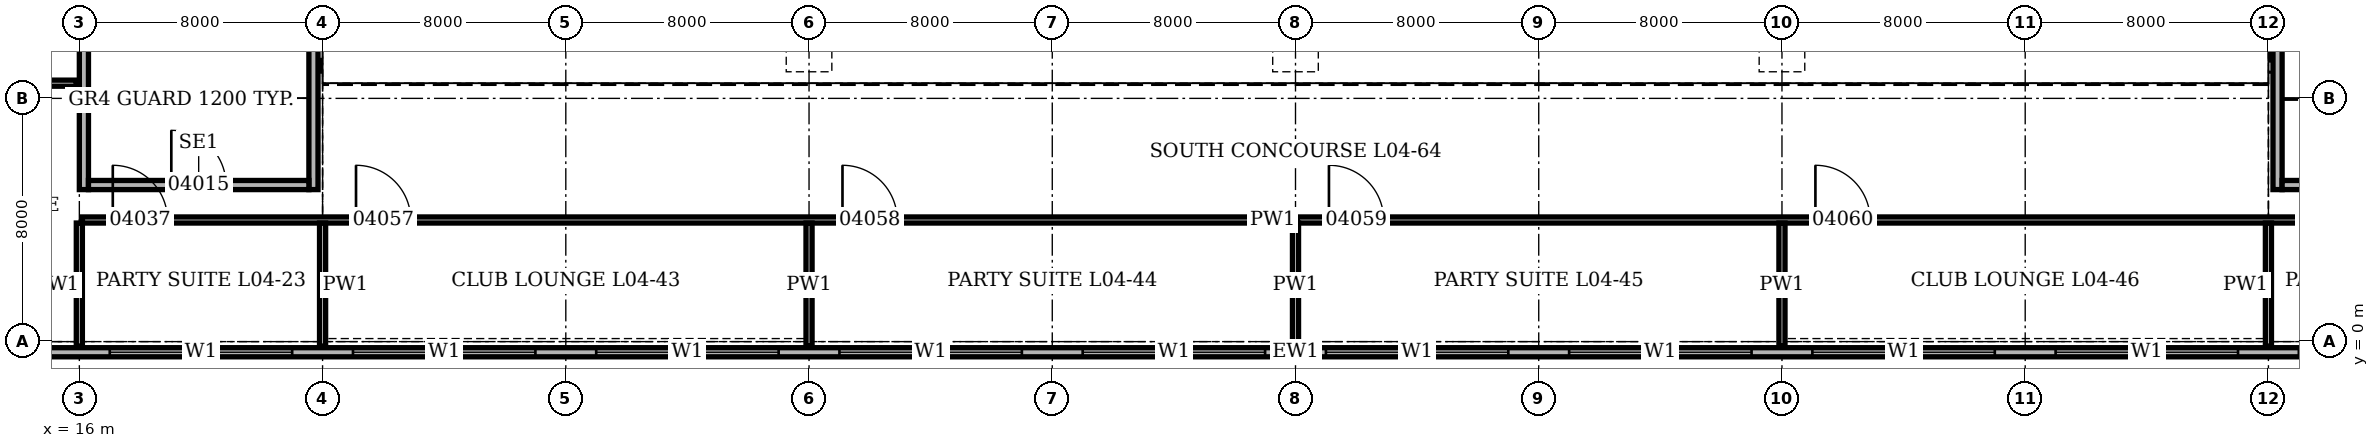
"""IFC4 building model, lengths in metres.
Left out: names, types, materials, properties, quantities, classifications, styles, units other than length and angle.
Written with IfcOpenShell. Run it as: python <this file> out.ifc"""

import sys

from ifc_helpers import new_model, si_unit, direction, frame, frame_2d, origin, place, context, subcontext, project, spatial, rectangle, extrude, element, fill, save


model = new_model("IFC4")
c1 = context("Model", 3, precision=1e-05, world=origin(), true_north=direction((0.0, 1.0)))
c2 = subcontext(c1, "Body", "Model", "MODEL_VIEW")
j1 = project(units=[si_unit("LENGTHUNIT", "METRE"), si_unit("PLANEANGLEUNIT", "RADIAN")], contexts=[c1])
p1 = place(None, origin())
s1 = spatial("IfcSite", under=j1, at=p1, CompositionType="ELEMENT")
p2 = place(p1, origin())
s2 = spatial("IfcBuilding", under=s1, at=p2, CompositionType="ELEMENT")
p3 = place(p2, frame((0.0, 0.0, 19.9)))
s3 = spatial("IfcBuildingStorey", under=s2, at=p3, CompositionType="ELEMENT", Elevation=19.9)
p4 = place(p3, frame((-0.35, -0.35, 0.0), z_axis=(0.0, 0.0, 1.0), x_axis=(1.0, 0.0, 0.0)))
e1 = element("IfcWall", 1, at=p4, inside=s3, PredefinedType="SOLIDWALL", context=c2, shape_type="SweptSolid", body=[
    extrude(rectangle(XDim=112.7, YDim=0.3, at=frame_2d((56.35, 0.0))), origin(), (0.0, 0.0, 1.0), 6.0),
])
p5 = place(p4, frame((1.35, 0.0, 1.0)))
e2 = element("IfcOpeningElement", 2, at=p5, cuts=e1, PredefinedType="OPENING", context=c2, shape_type="SweptSolid", body=[
    extrude(rectangle(XDim=6.0, YDim=1.5, at=frame_2d((3.0, 0.75))), frame((0.0, 0.16, 0.0), z_axis=(0.0, -1.0, 0.0), x_axis=(1.0, 0.0, 0.0)), (0.0, 0.0, 1.0), 0.32),
])
p6 = place(p4, frame((9.35, 0.0, 1.0)))
e3 = element("IfcOpeningElement", 3, at=p6, cuts=e1, PredefinedType="OPENING", context=c2, shape_type="SweptSolid", body=[
    extrude(rectangle(XDim=6.0, YDim=1.5, at=frame_2d((3.0, 0.75))), frame((0.0, 0.16, 0.0), z_axis=(0.0, -1.0, 0.0), x_axis=(1.0, 0.0, 0.0)), (0.0, 0.0, 1.0), 0.32),
])
p7 = place(p4, frame((17.35, 0.0, 1.0)))
e4 = element("IfcOpeningElement", 4, at=p7, cuts=e1, PredefinedType="OPENING", context=c2, shape_type="SweptSolid", body=[
    extrude(rectangle(XDim=6.0, YDim=1.5, at=frame_2d((3.0, 0.75))), frame((0.0, 0.16, 0.0), z_axis=(0.0, -1.0, 0.0), x_axis=(1.0, 0.0, 0.0)), (0.0, 0.0, 1.0), 0.32),
])
p8 = place(p4, frame((25.35, 0.0, 1.0)))
e5 = element("IfcOpeningElement", 5, at=p8, cuts=e1, PredefinedType="OPENING", context=c2, shape_type="SweptSolid", body=[
    extrude(rectangle(XDim=6.0, YDim=1.5, at=frame_2d((3.0, 0.75))), frame((0.0, 0.16, 0.0), z_axis=(0.0, -1.0, 0.0), x_axis=(1.0, 0.0, 0.0)), (0.0, 0.0, 1.0), 0.32),
])
p9 = place(p4, frame((33.35, 0.0, 1.0)))
e6 = element("IfcOpeningElement", 6, at=p9, cuts=e1, PredefinedType="OPENING", context=c2, shape_type="SweptSolid", body=[
    extrude(rectangle(XDim=6.0, YDim=1.5, at=frame_2d((3.0, 0.75))), frame((0.0, 0.16, 0.0), z_axis=(0.0, -1.0, 0.0), x_axis=(1.0, 0.0, 0.0)), (0.0, 0.0, 1.0), 0.32),
])
p10 = place(p4, frame((41.35, 0.0, 1.0)))
e7 = element("IfcOpeningElement", 7, at=p10, cuts=e1, PredefinedType="OPENING", context=c2, shape_type="SweptSolid", body=[
    extrude(rectangle(XDim=6.0, YDim=1.5, at=frame_2d((3.0, 0.75))), frame((0.0, 0.16, 0.0), z_axis=(0.0, -1.0, 0.0), x_axis=(1.0, 0.0, 0.0)), (0.0, 0.0, 1.0), 0.32),
])
p11 = place(p4, frame((49.35, 0.0, 1.0)))
e8 = element("IfcOpeningElement", 8, at=p11, cuts=e1, PredefinedType="OPENING", context=c2, shape_type="SweptSolid", body=[
    extrude(rectangle(XDim=6.0, YDim=1.5, at=frame_2d((3.0, 0.75))), frame((0.0, 0.16, 0.0), z_axis=(0.0, -1.0, 0.0), x_axis=(1.0, 0.0, 0.0)), (0.0, 0.0, 1.0), 0.32),
])
p12 = place(p4, frame((57.35, 0.0, 1.0)))
e9 = element("IfcOpeningElement", 9, at=p12, cuts=e1, PredefinedType="OPENING", context=c2, shape_type="SweptSolid", body=[
    extrude(rectangle(XDim=6.0, YDim=1.5, at=frame_2d((3.0, 0.75))), frame((0.0, 0.16, 0.0), z_axis=(0.0, -1.0, 0.0), x_axis=(1.0, 0.0, 0.0)), (0.0, 0.0, 1.0), 0.32),
])
p13 = place(p4, frame((65.35, 0.0, 1.0)))
e10 = element("IfcOpeningElement", 10, at=p13, cuts=e1, PredefinedType="OPENING", context=c2, shape_type="SweptSolid", body=[
    extrude(rectangle(XDim=6.0, YDim=1.5, at=frame_2d((3.0, 0.75))), frame((0.0, 0.16, 0.0), z_axis=(0.0, -1.0, 0.0), x_axis=(1.0, 0.0, 0.0)), (0.0, 0.0, 1.0), 0.32),
])
p14 = place(p4, frame((73.35, 0.0, 1.0)))
e11 = element("IfcOpeningElement", 11, at=p14, cuts=e1, PredefinedType="OPENING", context=c2, shape_type="SweptSolid", body=[
    extrude(rectangle(XDim=6.0, YDim=1.5, at=frame_2d((3.0, 0.75))), frame((0.0, 0.16, 0.0), z_axis=(0.0, -1.0, 0.0), x_axis=(1.0, 0.0, 0.0)), (0.0, 0.0, 1.0), 0.32),
])
p15 = place(p4, frame((81.35, 0.0, 1.0)))
e12 = element("IfcOpeningElement", 12, at=p15, cuts=e1, PredefinedType="OPENING", context=c2, shape_type="SweptSolid", body=[
    extrude(rectangle(XDim=6.0, YDim=1.5, at=frame_2d((3.0, 0.75))), frame((0.0, 0.16, 0.0), z_axis=(0.0, -1.0, 0.0), x_axis=(1.0, 0.0, 0.0)), (0.0, 0.0, 1.0), 0.32),
])
p16 = place(p4, frame((89.35, 0.0, 1.0)))
e13 = element("IfcOpeningElement", 13, at=p16, cuts=e1, PredefinedType="OPENING", context=c2, shape_type="SweptSolid", body=[
    extrude(rectangle(XDim=6.0, YDim=1.5, at=frame_2d((3.0, 0.75))), frame((0.0, 0.16, 0.0), z_axis=(0.0, -1.0, 0.0), x_axis=(1.0, 0.0, 0.0)), (0.0, 0.0, 1.0), 0.32),
])
p17 = place(p4, frame((97.35, 0.0, 1.0)))
e14 = element("IfcOpeningElement", 14, at=p17, cuts=e1, PredefinedType="OPENING", context=c2, shape_type="SweptSolid", body=[
    extrude(rectangle(XDim=6.0, YDim=1.5, at=frame_2d((3.0, 0.75))), frame((0.0, 0.16, 0.0), z_axis=(0.0, -1.0, 0.0), x_axis=(1.0, 0.0, 0.0)), (0.0, 0.0, 1.0), 0.32),
])
p18 = place(p4, frame((105.35, 0.0, 1.0)))
e15 = element("IfcOpeningElement", 15, at=p18, cuts=e1, PredefinedType="OPENING", context=c2, shape_type="SweptSolid", body=[
    extrude(rectangle(XDim=6.0, YDim=1.5, at=frame_2d((3.0, 0.75))), frame((0.0, 0.16, 0.0), z_axis=(0.0, -1.0, 0.0), x_axis=(1.0, 0.0, 0.0)), (0.0, 0.0, 1.0), 0.32),
])
for number, where, z_axis, x_axis in (
    (16, (16.15, 5.0, 0.0), (0.0, 0.0, 1.0), (0.0, 1.0, 0.0)),
    (17, (23.7, 5.0, 0.0), (0.0, 0.0, 1.0), (0.0, 1.0, 0.0)),
):
    element("IfcWall", number, at=place(p3, frame(where, z_axis=z_axis, x_axis=x_axis)), inside=s3, PredefinedType="SOLIDWALL", context=c2, shape_type="SweptSolid", body=[
        extrude(rectangle(XDim=10.85, YDim=0.3, at=frame_2d((5.425, 0.0))), origin(), (0.0, 0.0, 1.0), 5.75),
    ])
p19 = place(p3, frame((16.3, 5.15, 0.0), z_axis=(0.0, 0.0, 1.0), x_axis=(1.0, 0.0, 0.0)))
e18 = element("IfcWall", 18, at=p19, inside=s3, PredefinedType="SOLIDWALL", context=c2, shape_type="SweptSolid", body=[
    extrude(rectangle(XDim=7.25, YDim=0.3, at=frame_2d((3.625, 0.0))), origin(), (0.0, 0.0, 1.0), 5.75),
])
p20 = place(p19, frame((2.725, 0.0, 0.0)))
e19 = element("IfcOpeningElement", 19, at=p20, cuts=e18, PredefinedType="OPENING", context=c2, shape_type="SweptSolid", body=[
    extrude(rectangle(XDim=1.8, YDim=2.1, at=frame_2d((0.9, 1.05))), frame((0.0, 0.16, 0.0), z_axis=(0.0, -1.0, 0.0), x_axis=(1.0, 0.0, 0.0)), (0.0, 0.0, 1.0), 0.32),
])
p21 = place(p3, frame((88.3, 5.0, 0.0), z_axis=(0.0, 0.0, 1.0), x_axis=(0.0, 1.0, 0.0)))
e20 = element("IfcWall", 20, at=p21, inside=s3, PredefinedType="SOLIDWALL", context=c2, shape_type="SweptSolid", body=[
    extrude(rectangle(XDim=10.85, YDim=0.3, at=frame_2d((5.425, 0.0))), origin(), (0.0, 0.0, 1.0), 5.75),
])
p22 = place(p3, frame((88.45, 5.15, 0.0), z_axis=(0.0, 0.0, 1.0), x_axis=(1.0, 0.0, 0.0)))
e21 = element("IfcWall", 21, at=p22, inside=s3, PredefinedType="SOLIDWALL", context=c2, shape_type="SweptSolid", body=[
    extrude(rectangle(XDim=7.25, YDim=0.3, at=frame_2d((3.625, 0.0))), origin(), (0.0, 0.0, 1.0), 5.75),
])
p23 = place(p22, frame((2.725, 0.0, 0.0)))
e22 = element("IfcOpeningElement", 22, at=p23, cuts=e21, PredefinedType="OPENING", context=c2, shape_type="SweptSolid", body=[
    extrude(rectangle(XDim=1.8, YDim=2.1, at=frame_2d((0.9, 1.05))), frame((0.0, 0.16, 0.0), z_axis=(0.0, -1.0, 0.0), x_axis=(1.0, 0.0, 0.0)), (0.0, 0.0, 1.0), 0.32),
])
p24 = place(p3, frame((16.1, 4.0, 0.0), z_axis=(0.0, 0.0, 1.0), x_axis=(1.0, 0.0, 0.0)))
e23 = element("IfcWall", 23, at=p24, inside=s3, PredefinedType="PARTITIONING", context=c2, shape_type="SweptSolid", body=[
    extrude(rectangle(XDim=79.8, YDim=0.2, at=frame_2d((39.9, 0.0))), origin(), (0.0, 0.0, 1.0), 5.75),
])
p25 = place(p24, frame((1.0, 0.0, 0.0)))
e24 = element("IfcOpeningElement", 24, at=p25, cuts=e23, PredefinedType="OPENING", context=c2, shape_type="SweptSolid", body=[
    extrude(rectangle(XDim=1.8, YDim=2.4, at=frame_2d((0.9, 1.2))), frame((0.0, 0.11, 0.0), z_axis=(0.0, -1.0, 0.0), x_axis=(1.0, 0.0, 0.0)), (0.0, 0.0, 1.0), 0.22),
])
p26 = place(p24, frame((73.0, 0.0, 0.0)))
e25 = element("IfcOpeningElement", 25, at=p26, cuts=e23, PredefinedType="OPENING", context=c2, shape_type="SweptSolid", body=[
    extrude(rectangle(XDim=1.8, YDim=2.4, at=frame_2d((0.9, 1.2))), frame((0.0, 0.11, 0.0), z_axis=(0.0, -1.0, 0.0), x_axis=(1.0, 0.0, 0.0)), (0.0, 0.0, 1.0), 0.22),
])
p27 = place(p24, frame((9.0, 0.0, 0.0)))
e26 = element("IfcOpeningElement", 26, at=p27, cuts=e23, PredefinedType="OPENING", context=c2, shape_type="SweptSolid", body=[
    extrude(rectangle(XDim=1.8, YDim=2.4, at=frame_2d((0.9, 1.2))), frame((0.0, 0.11, 0.0), z_axis=(0.0, -1.0, 0.0), x_axis=(1.0, 0.0, 0.0)), (0.0, 0.0, 1.0), 0.22),
])
p28 = place(p24, frame((25.0, 0.0, 0.0)))
e27 = element("IfcOpeningElement", 27, at=p28, cuts=e23, PredefinedType="OPENING", context=c2, shape_type="SweptSolid", body=[
    extrude(rectangle(XDim=1.8, YDim=2.4, at=frame_2d((0.9, 1.2))), frame((0.0, 0.11, 0.0), z_axis=(0.0, -1.0, 0.0), x_axis=(1.0, 0.0, 0.0)), (0.0, 0.0, 1.0), 0.22),
])
p29 = place(p24, frame((41.0, 0.0, 0.0)))
e28 = element("IfcOpeningElement", 28, at=p29, cuts=e23, PredefinedType="OPENING", context=c2, shape_type="SweptSolid", body=[
    extrude(rectangle(XDim=1.8, YDim=2.4, at=frame_2d((0.9, 1.2))), frame((0.0, 0.11, 0.0), z_axis=(0.0, -1.0, 0.0), x_axis=(1.0, 0.0, 0.0)), (0.0, 0.0, 1.0), 0.22),
])
p30 = place(p24, frame((57.0, 0.0, 0.0)))
e29 = element("IfcOpeningElement", 29, at=p30, cuts=e23, PredefinedType="OPENING", context=c2, shape_type="SweptSolid", body=[
    extrude(rectangle(XDim=1.8, YDim=2.4, at=frame_2d((0.9, 1.2))), frame((0.0, 0.11, 0.0), z_axis=(0.0, -1.0, 0.0), x_axis=(1.0, 0.0, 0.0)), (0.0, 0.0, 1.0), 0.22),
])
p31 = place(p3, frame((11.6, 8.5, 0.0), z_axis=(0.0, 0.0, 1.0), x_axis=(1.0, 0.0, 0.0)))
e30 = element("IfcWall", 30, at=p31, inside=s3, PredefinedType="PARTITIONING", context=c2, shape_type="SweptSolid", body=[
    extrude(rectangle(XDim=4.3, YDim=0.2, at=frame_2d((2.15, 0.0))), origin(), (0.0, 0.0, 1.0), 5.75),
])
for number, where, z_axis, x_axis in (
    (31, (16.0, -0.15, 0.0), (0.0, 0.0, 1.0), (0.0, 1.0, 0.0)),
    (32, (24.0, -0.15, 0.0), (0.0, 0.0, 1.0), (0.0, 1.0, 0.0)),
    (33, (40.0, -0.15, 0.0), (0.0, 0.0, 1.0), (0.0, 1.0, 0.0)),
    (34, (56.0, -0.15, 0.0), (0.0, 0.0, 1.0), (0.0, 1.0, 0.0)),
    (35, (72.0, -0.15, 0.0), (0.0, 0.0, 1.0), (0.0, 1.0, 0.0)),
    (36, (88.0, -0.15, 0.0), (0.0, 0.0, 1.0), (0.0, 1.0, 0.0)),
):
    element("IfcWall", number, at=place(p3, frame(where, z_axis=z_axis, x_axis=x_axis)), inside=s3, PredefinedType="PARTITIONING", context=c2, shape_type="SweptSolid", body=[
        extrude(rectangle(XDim=4.05, YDim=0.2, at=frame_2d((2.025, 0.0))), origin(), (0.0, 0.0, 1.0), 5.75),
    ])
p32 = place(p7, origin())
e37 = element("IfcWindow", 37, at=p32, inside=s3, PartitioningType="SINGLE_PANEL", PredefinedType="WINDOW", context=c2, shape_type="SweptSolid", body=[
    extrude(rectangle(XDim=6.0, YDim=1.5, at=frame_2d((3.0, 0.75))), frame((0.0, 0.03, 0.0), z_axis=(0.0, -1.0, 0.0), x_axis=(1.0, 0.0, 0.0)), (0.0, 0.0, 1.0), 0.06),
])
fill(e4, e37)
p33 = place(p8, origin())
e38 = element("IfcWindow", 38, at=p33, inside=s3, PartitioningType="SINGLE_PANEL", PredefinedType="WINDOW", context=c2, shape_type="SweptSolid", body=[
    extrude(rectangle(XDim=6.0, YDim=1.5, at=frame_2d((3.0, 0.75))), frame((0.0, 0.03, 0.0), z_axis=(0.0, -1.0, 0.0), x_axis=(1.0, 0.0, 0.0)), (0.0, 0.0, 1.0), 0.06),
])
fill(e5, e38)
p34 = place(p9, origin())
e39 = element("IfcWindow", 39, at=p34, inside=s3, PartitioningType="SINGLE_PANEL", PredefinedType="WINDOW", context=c2, shape_type="SweptSolid", body=[
    extrude(rectangle(XDim=6.0, YDim=1.5, at=frame_2d((3.0, 0.75))), frame((0.0, 0.03, 0.0), z_axis=(0.0, -1.0, 0.0), x_axis=(1.0, 0.0, 0.0)), (0.0, 0.0, 1.0), 0.06),
])
fill(e6, e39)
p35 = place(p10, origin())
e40 = element("IfcWindow", 40, at=p35, inside=s3, PartitioningType="SINGLE_PANEL", PredefinedType="WINDOW", context=c2, shape_type="SweptSolid", body=[
    extrude(rectangle(XDim=6.0, YDim=1.5, at=frame_2d((3.0, 0.75))), frame((0.0, 0.03, 0.0), z_axis=(0.0, -1.0, 0.0), x_axis=(1.0, 0.0, 0.0)), (0.0, 0.0, 1.0), 0.06),
])
fill(e7, e40)
p36 = place(p11, origin())
e41 = element("IfcWindow", 41, at=p36, inside=s3, PartitioningType="SINGLE_PANEL", PredefinedType="WINDOW", context=c2, shape_type="SweptSolid", body=[
    extrude(rectangle(XDim=6.0, YDim=1.5, at=frame_2d((3.0, 0.75))), frame((0.0, 0.03, 0.0), z_axis=(0.0, -1.0, 0.0), x_axis=(1.0, 0.0, 0.0)), (0.0, 0.0, 1.0), 0.06),
])
fill(e8, e41)
p37 = place(p12, origin())
e42 = element("IfcWindow", 42, at=p37, inside=s3, PartitioningType="SINGLE_PANEL", PredefinedType="WINDOW", context=c2, shape_type="SweptSolid", body=[
    extrude(rectangle(XDim=6.0, YDim=1.5, at=frame_2d((3.0, 0.75))), frame((0.0, 0.03, 0.0), z_axis=(0.0, -1.0, 0.0), x_axis=(1.0, 0.0, 0.0)), (0.0, 0.0, 1.0), 0.06),
])
fill(e9, e42)
p38 = place(p13, origin())
e43 = element("IfcWindow", 43, at=p38, inside=s3, PartitioningType="SINGLE_PANEL", PredefinedType="WINDOW", context=c2, shape_type="SweptSolid", body=[
    extrude(rectangle(XDim=6.0, YDim=1.5, at=frame_2d((3.0, 0.75))), frame((0.0, 0.03, 0.0), z_axis=(0.0, -1.0, 0.0), x_axis=(1.0, 0.0, 0.0)), (0.0, 0.0, 1.0), 0.06),
])
fill(e10, e43)
p39 = place(p14, origin())
e44 = element("IfcWindow", 44, at=p39, inside=s3, PartitioningType="SINGLE_PANEL", PredefinedType="WINDOW", context=c2, shape_type="SweptSolid", body=[
    extrude(rectangle(XDim=6.0, YDim=1.5, at=frame_2d((3.0, 0.75))), frame((0.0, 0.03, 0.0), z_axis=(0.0, -1.0, 0.0), x_axis=(1.0, 0.0, 0.0)), (0.0, 0.0, 1.0), 0.06),
])
fill(e11, e44)
p40 = place(p15, origin())
e45 = element("IfcWindow", 45, at=p40, inside=s3, PartitioningType="SINGLE_PANEL", PredefinedType="WINDOW", context=c2, shape_type="SweptSolid", body=[
    extrude(rectangle(XDim=6.0, YDim=1.5, at=frame_2d((3.0, 0.75))), frame((0.0, 0.03, 0.0), z_axis=(0.0, -1.0, 0.0), x_axis=(1.0, 0.0, 0.0)), (0.0, 0.0, 1.0), 0.06),
])
fill(e12, e45)
p41 = place(p20, origin())
e46 = element("IfcDoor", 46, at=p41, inside=s3, OperationType="DOUBLE_DOOR_SINGLE_SWING", PredefinedType="DOOR", context=c2, shape_type="SweptSolid", body=[
    extrude(rectangle(XDim=1.8, YDim=2.1, at=frame_2d((0.9, 1.05))), frame((0.0, 0.15, 0.0), z_axis=(0.0, -1.0, 0.0), x_axis=(1.0, 0.0, 0.0)), (0.0, 0.0, 1.0), 0.3),
])
fill(e19, e46)
p42 = place(p25, origin())
e47 = element("IfcDoor", 47, at=p42, inside=s3, OperationType="DOUBLE_DOOR_DOUBLE_SWING", PredefinedType="DOOR", context=c2, shape_type="SweptSolid", body=[
    extrude(rectangle(XDim=1.8, YDim=2.4, at=frame_2d((0.9, 1.2))), frame((0.0, 0.1, 0.0), z_axis=(0.0, -1.0, 0.0), x_axis=(1.0, 0.0, 0.0)), (0.0, 0.0, 1.0), 0.199),
])
fill(e24, e47)
p43 = place(p27, origin())
e48 = element("IfcDoor", 48, at=p43, inside=s3, OperationType="DOUBLE_DOOR_DOUBLE_SWING", PredefinedType="DOOR", context=c2, shape_type="SweptSolid", body=[
    extrude(rectangle(XDim=1.8, YDim=2.4, at=frame_2d((0.9, 1.2))), frame((0.0, 0.1, 0.0), z_axis=(0.0, -1.0, 0.0), x_axis=(1.0, 0.0, 0.0)), (0.0, 0.0, 1.0), 0.199),
])
fill(e26, e48)
p44 = place(p28, origin())
e49 = element("IfcDoor", 49, at=p44, inside=s3, OperationType="DOUBLE_DOOR_DOUBLE_SWING", PredefinedType="DOOR", context=c2, shape_type="SweptSolid", body=[
    extrude(rectangle(XDim=1.8, YDim=2.4, at=frame_2d((0.9, 1.2))), frame((0.0, 0.1, 0.0), z_axis=(0.0, -1.0, 0.0), x_axis=(1.0, 0.0, 0.0)), (0.0, 0.0, 1.0), 0.199),
])
fill(e27, e49)
p45 = place(p29, origin())
e50 = element("IfcDoor", 50, at=p45, inside=s3, OperationType="DOUBLE_DOOR_DOUBLE_SWING", PredefinedType="DOOR", context=c2, shape_type="SweptSolid", body=[
    extrude(rectangle(XDim=1.8, YDim=2.4, at=frame_2d((0.9, 1.2))), frame((0.0, 0.1, 0.0), z_axis=(0.0, -1.0, 0.0), x_axis=(1.0, 0.0, 0.0)), (0.0, 0.0, 1.0), 0.199),
])
fill(e28, e50)
p46 = place(p30, origin())
e51 = element("IfcDoor", 51, at=p46, inside=s3, OperationType="DOUBLE_DOOR_DOUBLE_SWING", PredefinedType="DOOR", context=c2, shape_type="SweptSolid", body=[
    extrude(rectangle(XDim=1.8, YDim=2.4, at=frame_2d((0.9, 1.2))), frame((0.0, 0.1, 0.0), z_axis=(0.0, -1.0, 0.0), x_axis=(1.0, 0.0, 0.0)), (0.0, 0.0, 1.0), 0.199),
])
fill(e29, e51)
save(model, sys.argv[1])
